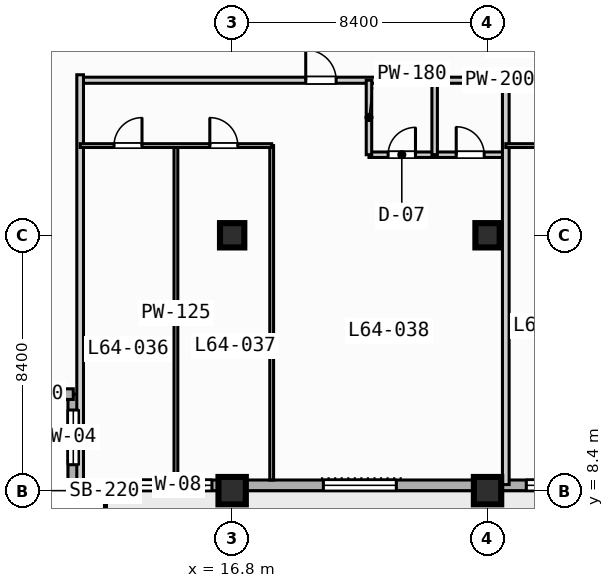
"""IFC4 building model, lengths in metres.
Left out: names, types, materials, properties, quantities, classifications, styles, units other than length and angle.
Written with IfcOpenShell. Run it as: python <this file> out.ifc"""

import sys

from ifc_helpers import new_model, si_unit, direction, frame, frame_2d, origin, origin_2d, place, context, subcontext, project, spatial, rectangle, extrude, element, fill, save


model = new_model("IFC4")
c1 = context("Model", 3, precision=1e-05, world=origin(), true_north=direction((0.0, 1.0)))
c2 = subcontext(c1, "Body", "Model", "MODEL_VIEW")
j1 = project(units=[si_unit("LENGTHUNIT", "METRE"), si_unit("PLANEANGLEUNIT", "RADIAN")], contexts=[c1])
p1 = place(None, origin())
s1 = spatial("IfcSite", under=j1, at=p1, CompositionType="ELEMENT")
p2 = place(p1, origin())
s2 = spatial("IfcBuilding", under=s1, at=p2, CompositionType="ELEMENT")
p3 = place(p2, frame((0.0, 0.0, 260.1)))
s3 = spatial("IfcBuildingStorey", under=s2, at=p3, CompositionType="ELEMENT", Elevation=260.1)
p4 = place(p3, frame((16.8, 8.4, 0.0), z_axis=(0.0, 0.0, 1.0), x_axis=(1.0, 0.0, 0.0)))
e1 = element("IfcColumn", 1, at=p4, inside=s3, PredefinedType="COLUMN", context=c2, shape_type="SweptSolid", body=[
    extrude(rectangle(XDim=0.9, YDim=0.9, at=origin_2d()), origin(), (0.0, 0.0, 1.0), 3.7),
])
p5 = place(p3, frame((16.8, 16.8, 0.0), z_axis=(0.0, 0.0, 1.0), x_axis=(1.0, 0.0, 0.0)))
e2 = element("IfcColumn", 2, at=p5, inside=s3, PredefinedType="COLUMN", context=c2, shape_type="SweptSolid", body=[
    extrude(rectangle(XDim=0.8, YDim=0.8, at=origin_2d()), origin(), (0.0, 0.0, 1.0), 3.7),
])
p6 = place(p3, frame((25.2, 8.4, 0.0), z_axis=(0.0, 0.0, 1.0), x_axis=(1.0, 0.0, 0.0)))
e3 = element("IfcColumn", 3, at=p6, inside=s3, PredefinedType="COLUMN", context=c2, shape_type="SweptSolid", body=[
    extrude(rectangle(XDim=0.9, YDim=0.9, at=origin_2d()), origin(), (0.0, 0.0, 1.0), 3.7),
])
p7 = place(p3, frame((25.2, 16.8, 0.0), z_axis=(0.0, 0.0, 1.0), x_axis=(1.0, 0.0, 0.0)))
e4 = element("IfcColumn", 4, at=p7, inside=s3, PredefinedType="COLUMN", context=c2, shape_type="SweptSolid", body=[
    extrude(rectangle(XDim=0.8, YDim=0.8, at=origin_2d()), origin(), (0.0, 0.0, 1.0), 3.7),
])
p8 = place(p3, frame((11.575, 8.575, 0.0), z_axis=(0.0, 0.0, 1.0), x_axis=(0.0, 1.0, 0.0)))
e5 = element("IfcWall", 5, at=p8, inside=s3, PredefinedType="STANDARD", context=c2, shape_type="SweptSolid", body=[
    extrude(rectangle(XDim=3.0, YDim=0.35, at=frame_2d((1.5, 0.0))), origin(), (0.0, 0.0, 1.0), 3.47),
])
p9 = place(p8, frame((0.677, 0.0, 0.85)))
e6 = element("IfcOpeningElement", 6, at=p9, cuts=e5, PredefinedType="OPENING", context=c2, shape_type="SweptSolid", body=[
    extrude(rectangle(XDim=1.8, YDim=1.8, at=frame_2d((0.9, 0.9))), frame((0.0, 0.185, 0.0), z_axis=(0.0, -1.0, 0.0), x_axis=(1.0, 0.0, 0.0)), (0.0, 0.0, 1.0), 0.37),
])
p10 = place(p3, frame((11.575, 11.575, 0.0), z_axis=(0.0, 0.0, 1.0), x_axis=(-1.0, 0.0, 0.0)))
e7 = element("IfcWall", 7, at=p10, inside=s3, PredefinedType="STANDARD", context=c2, shape_type="SweptSolid", body=[
    extrude(rectangle(XDim=3.0, YDim=0.35, at=frame_2d((1.5, 0.0))), origin(), (0.0, 0.0, 1.0), 3.47),
])
p11 = place(p3, frame((72.425, 8.575, 0.0), z_axis=(0.0, 0.0, 1.0), x_axis=(-1.0, 0.0, 0.0)))
e8 = element("IfcWall", 8, at=p11, inside=s3, PredefinedType="STANDARD", context=c2, shape_type="SweptSolid", body=[
    extrude(rectangle(XDim=60.85, YDim=0.35, at=frame_2d((30.425, 0.0))), origin(), (0.0, 0.0, 1.0), 3.47),
])
p12 = place(p11, frame((41.325, 0.0, 0.0)))
e9 = element("IfcOpeningElement", 9, at=p12, cuts=e8, PredefinedType="OPENING", context=c2, shape_type="SweptSolid", body=[
    extrude(rectangle(XDim=1.4, YDim=2.2, at=frame_2d((0.7, 1.1))), frame((0.0, 0.185, 0.0), z_axis=(0.0, -1.0, 0.0), x_axis=(1.0, 0.0, 0.0)), (0.0, 0.0, 1.0), 0.37),
])
p13 = place(p11, frame((50.225, 0.0, 0.85)))
e10 = element("IfcOpeningElement", 10, at=p13, cuts=e8, PredefinedType="OPENING", context=c2, shape_type="SweptSolid", body=[
    extrude(rectangle(XDim=2.4, YDim=1.95, at=frame_2d((1.2, 0.975))), frame((0.0, 0.185, 0.0), z_axis=(0.0, -1.0, 0.0), x_axis=(1.0, 0.0, 0.0)), (0.0, 0.0, 1.0), 0.37),
])
p14 = place(p11, frame((33.425, 0.0, 0.85)))
e11 = element("IfcOpeningElement", 11, at=p14, cuts=e8, PredefinedType="OPENING", context=c2, shape_type="SweptSolid", body=[
    extrude(rectangle(XDim=2.4, YDim=1.95, at=frame_2d((1.2, 0.975))), frame((0.0, 0.185, 0.0), z_axis=(0.0, -1.0, 0.0), x_axis=(1.0, 0.0, 0.0)), (0.0, 0.0, 1.0), 0.37),
])
p15 = place(p11, frame((25.325, 0.0, 0.85)))
e12 = element("IfcOpeningElement", 12, at=p15, cuts=e8, PredefinedType="OPENING", context=c2, shape_type="SweptSolid", body=[
    extrude(rectangle(XDim=1.8, YDim=1.8, at=frame_2d((0.9, 0.9))), frame((0.0, 0.185, 0.0), z_axis=(0.0, -1.0, 0.0), x_axis=(1.0, 0.0, 0.0)), (0.0, 0.0, 1.0), 0.37),
])
p16 = place(p11, frame((58.15, 0.0, 0.85)))
e13 = element("IfcOpeningElement", 13, at=p16, cuts=e8, PredefinedType="OPENING", context=c2, shape_type="SweptSolid", body=[
    extrude(rectangle(XDim=1.8, YDim=1.8, at=frame_2d((0.9, 0.9))), frame((0.0, 0.185, 0.0), z_axis=(0.0, -1.0, 0.0), x_axis=(1.0, 0.0, 0.0)), (0.0, 0.0, 1.0), 0.37),
])
p17 = place(p11, frame((56.29, 0.0, 0.85)))
e14 = element("IfcOpeningElement", 14, at=p17, cuts=e8, PredefinedType="OPENING", context=c2, shape_type="SweptSolid", body=[
    extrude(rectangle(XDim=0.72, YDim=1.8, at=frame_2d((0.36, 0.9))), frame((0.0, 0.185, 0.0), z_axis=(0.0, -1.0, 0.0), x_axis=(1.0, 0.0, 0.0)), (0.0, 0.0, 1.0), 0.37),
])
p18 = place(p11, frame((44.15, 0.0, 0.85)))
e15 = element("IfcOpeningElement", 15, at=p18, cuts=e8, PredefinedType="OPENING", context=c2, shape_type="SweptSolid", body=[
    extrude(rectangle(XDim=1.8, YDim=1.8, at=frame_2d((0.9, 0.9))), frame((0.0, 0.185, 0.0), z_axis=(0.0, -1.0, 0.0), x_axis=(1.0, 0.0, 0.0)), (0.0, 0.0, 1.0), 0.37),
])
p19 = place(p3, frame((11.8, 21.9, 0.0), z_axis=(0.0, 0.0, 1.0), x_axis=(1.0, 0.0, 0.0)))
e16 = element("IfcWall", 16, at=p19, inside=s3, PredefinedType="PARTITIONING", context=c2, shape_type="SweptSolid", body=[
    extrude(rectangle(XDim=27.6, YDim=0.2, at=frame_2d((13.8, 0.0))), origin(), (0.0, 0.0, 1.0), 3.47),
])
p20 = place(p19, frame((7.42, 0.0, 0.0)))
e17 = element("IfcOpeningElement", 17, at=p20, cuts=e16, PredefinedType="OPENING", context=c2, shape_type="SweptSolid", body=[
    extrude(rectangle(XDim=1.0, YDim=2.15, at=frame_2d((0.5, 1.075))), frame((0.0, 0.11, 0.0), z_axis=(0.0, -1.0, 0.0), x_axis=(1.0, 0.0, 0.0)), (0.0, 0.0, 1.0), 0.22),
])
p21 = place(p19, frame((21.22, 0.0, 0.0)))
e18 = element("IfcOpeningElement", 18, at=p21, cuts=e16, PredefinedType="OPENING", context=c2, shape_type="SweptSolid", body=[
    extrude(rectangle(XDim=1.0, YDim=2.15, at=frame_2d((0.5, 1.075))), frame((0.0, 0.11, 0.0), z_axis=(0.0, -1.0, 0.0), x_axis=(1.0, 0.0, 0.0)), (0.0, 0.0, 1.0), 0.22),
])
p22 = place(p3, frame((11.8, 8.6, 0.0), z_axis=(0.0, 0.0, 1.0), x_axis=(0.0, 1.0, 0.0)))
e19 = element("IfcWall", 19, at=p22, inside=s3, PredefinedType="PARTITIONING", context=c2, shape_type="SweptSolid", body=[
    extrude(rectangle(XDim=13.48, YDim=0.22, at=frame_2d((6.74, 0.0))), origin(), (0.0, 0.0, 1.0), 3.47),
])
p23 = place(p3, frame((21.3, 19.45, 0.0), z_axis=(0.0, 0.0, 1.0), x_axis=(1.0, 0.0, 0.0)))
e20 = element("IfcWall", 20, at=p23, inside=s3, PredefinedType="PLUMBINGWALL", context=c2, shape_type="SweptSolid", body=[
    extrude(rectangle(XDim=4.5, YDim=0.18, at=frame_2d((2.25, 0.0))), origin(), (0.0, 0.0, 1.0), 3.47),
])
p24 = place(p23, frame((0.63, 0.0, 0.0)))
e21 = element("IfcOpeningElement", 21, at=p24, cuts=e20, PredefinedType="OPENING", context=c2, shape_type="SweptSolid", body=[
    extrude(rectangle(XDim=0.9, YDim=2.1, at=frame_2d((0.45, 1.05))), frame((0.0, 0.1, 0.0), z_axis=(0.0, -1.0, 0.0), x_axis=(1.0, 0.0, 0.0)), (0.0, 0.0, 1.0), 0.2),
])
p25 = place(p23, frame((2.87, 0.0, 0.0)))
e22 = element("IfcOpeningElement", 22, at=p25, cuts=e20, PredefinedType="OPENING", context=c2, shape_type="SweptSolid", body=[
    extrude(rectangle(XDim=0.92, YDim=2.1, at=frame_2d((0.46, 1.05))), frame((0.0, 0.1, 0.0), z_axis=(0.0, -1.0, 0.0), x_axis=(1.0, 0.0, 0.0)), (0.0, 0.0, 1.0), 0.2),
])
for number, where, z_axis, x_axis in (
    (23, (21.3, 19.45, 0.0), (0.0, 0.0, 1.0), (0.0, 1.0, 0.0)),
    (24, (23.46, 19.45, 0.0), (0.0, 0.0, 1.0), (0.0, 1.0, 0.0)),
):
    element("IfcWall", number, at=place(p3, frame(where, z_axis=z_axis, x_axis=x_axis)), inside=s3, PredefinedType="PLUMBINGWALL", context=c2, shape_type="SweptSolid", body=[
        extrude(rectangle(XDim=2.45, YDim=0.18, at=frame_2d((1.225, 0.0))), origin(), (0.0, 0.0, 1.0), 3.47),
    ])
for number, where, z_axis, x_axis in (
    (25, (14.95, 8.75, 0.0), (0.0, 0.0, 1.0), (0.0, 1.0, 0.0)),
    (26, (18.1, 8.75, 0.0), (0.0, 0.0, 1.0), (0.0, 1.0, 0.0)),
):
    element("IfcWall", number, at=place(p3, frame(where, z_axis=z_axis, x_axis=x_axis)), inside=s3, PredefinedType="PARTITIONING", context=c2, shape_type="SweptSolid", body=[
        extrude(rectangle(XDim=11.0, YDim=0.125, at=frame_2d((5.5, 0.0))), origin(), (0.0, 0.0, 1.0), 3.47),
    ])
p26 = place(p3, frame((11.8, 19.75, 0.0), z_axis=(0.0, 0.0, 1.0), x_axis=(1.0, 0.0, 0.0)))
e27 = element("IfcWall", 27, at=p26, inside=s3, PredefinedType="PARTITIONING", context=c2, shape_type="SweptSolid", body=[
    extrude(rectangle(XDim=6.3, YDim=0.125, at=frame_2d((3.15, 0.0))), origin(), (0.0, 0.0, 1.0), 3.47),
])
p27 = place(p26, frame((1.115, 0.0, 0.0)))
e28 = element("IfcOpeningElement", 28, at=p27, cuts=e27, PredefinedType="OPENING", context=c2, shape_type="SweptSolid", body=[
    extrude(rectangle(XDim=0.92, YDim=2.1, at=frame_2d((0.46, 1.05))), frame((0.0, 0.073, 0.0), z_axis=(0.0, -1.0, 0.0), x_axis=(1.0, 0.0, 0.0)), (0.0, 0.0, 1.0), 0.145),
])
p28 = place(p26, frame((4.265, 0.0, 0.0)))
e29 = element("IfcOpeningElement", 29, at=p28, cuts=e27, PredefinedType="OPENING", context=c2, shape_type="SweptSolid", body=[
    extrude(rectangle(XDim=0.92, YDim=2.1, at=frame_2d((0.46, 1.05))), frame((0.0, 0.073, 0.0), z_axis=(0.0, -1.0, 0.0), x_axis=(1.0, 0.0, 0.0)), (0.0, 0.0, 1.0), 0.145),
])
p29 = place(p3, frame((25.8, 8.6, 0.0), z_axis=(0.0, 0.0, 1.0), x_axis=(0.0, 1.0, 0.0)))
e30 = element("IfcWall", 30, at=p29, inside=s3, PredefinedType="PARTITIONING", context=c2, shape_type="SweptSolid", body=[
    extrude(rectangle(XDim=13.48, YDim=0.22, at=frame_2d((6.74, 0.0))), origin(), (0.0, 0.0, 1.0), 3.47),
])
p30 = place(p3, frame((25.8, 19.75, 0.0), z_axis=(0.0, 0.0, 1.0), x_axis=(1.0, 0.0, 0.0)))
e31 = element("IfcWall", 31, at=p30, inside=s3, PredefinedType="PARTITIONING", context=c2, shape_type="SweptSolid", body=[
    extrude(rectangle(XDim=6.3, YDim=0.125, at=frame_2d((3.15, 0.0))), origin(), (0.0, 0.0, 1.0), 3.47),
])
p31 = place(p30, frame((1.115, 0.0, 0.0)))
e32 = element("IfcOpeningElement", 32, at=p31, cuts=e31, PredefinedType="OPENING", context=c2, shape_type="SweptSolid", body=[
    extrude(rectangle(XDim=0.92, YDim=2.1, at=frame_2d((0.46, 1.05))), frame((0.0, 0.073, 0.0), z_axis=(0.0, -1.0, 0.0), x_axis=(1.0, 0.0, 0.0)), (0.0, 0.0, 1.0), 0.145),
])
p32 = place(p30, frame((4.265, 0.0, 0.0)))
e33 = element("IfcOpeningElement", 33, at=p32, cuts=e31, PredefinedType="OPENING", context=c2, shape_type="SweptSolid", body=[
    extrude(rectangle(XDim=0.92, YDim=2.1, at=frame_2d((0.46, 1.05))), frame((0.0, 0.073, 0.0), z_axis=(0.0, -1.0, 0.0), x_axis=(1.0, 0.0, 0.0)), (0.0, 0.0, 1.0), 0.145),
])
p33 = place(p9, origin())
e34 = element("IfcWindow", 34, at=p33, inside=s3, PartitioningType="SINGLE_PANEL", PredefinedType="WINDOW", context=c2, shape_type="SweptSolid", body=[
    extrude(rectangle(XDim=1.8, YDim=1.8, at=frame_2d((0.9, 0.9))), frame((0.0, 0.03, 0.0), z_axis=(0.0, -1.0, 0.0), x_axis=(1.0, 0.0, 0.0)), (0.0, 0.0, 1.0), 0.06),
])
fill(e6, e34)
p34 = place(p13, origin())
e35 = element("IfcWindow", 35, at=p34, inside=s3, PartitioningType="SINGLE_PANEL", PredefinedType="WINDOW", context=c2, shape_type="SweptSolid", body=[
    extrude(rectangle(XDim=2.4, YDim=1.95, at=frame_2d((1.2, 0.975))), frame((0.0, 0.03, 0.0), z_axis=(0.0, -1.0, 0.0), x_axis=(1.0, 0.0, 0.0)), (0.0, 0.0, 1.0), 0.06),
])
fill(e10, e35)
p35 = place(p16, origin())
e36 = element("IfcWindow", 36, at=p35, inside=s3, PartitioningType="SINGLE_PANEL", PredefinedType="WINDOW", context=c2, shape_type="SweptSolid", body=[
    extrude(rectangle(XDim=1.8, YDim=1.8, at=frame_2d((0.9, 0.9))), frame((0.0, 0.03, 0.0), z_axis=(0.0, -1.0, 0.0), x_axis=(1.0, 0.0, 0.0)), (0.0, 0.0, 1.0), 0.06),
])
fill(e13, e36)
p36 = place(p17, origin())
e37 = element("IfcWindow", 37, at=p36, inside=s3, PartitioningType="SINGLE_PANEL", PredefinedType="WINDOW", context=c2, shape_type="SweptSolid", body=[
    extrude(rectangle(XDim=0.72, YDim=1.8, at=frame_2d((0.36, 0.9))), frame((0.0, 0.03, 0.0), z_axis=(0.0, -1.0, 0.0), x_axis=(1.0, 0.0, 0.0)), (0.0, 0.0, 1.0), 0.06),
])
fill(e14, e37)
p37 = place(p18, origin())
e38 = element("IfcWindow", 38, at=p37, inside=s3, PartitioningType="SINGLE_PANEL", PredefinedType="WINDOW", context=c2, shape_type="SweptSolid", body=[
    extrude(rectangle(XDim=1.8, YDim=1.8, at=frame_2d((0.9, 0.9))), frame((0.0, 0.03, 0.0), z_axis=(0.0, -1.0, 0.0), x_axis=(1.0, 0.0, 0.0)), (0.0, 0.0, 1.0), 0.06),
])
fill(e15, e38)
p38 = place(p20, origin())
e39 = element("IfcDoor", 39, at=p38, inside=s3, OperationType="SINGLE_SWING_LEFT", PredefinedType="DOOR", context=c2, shape_type="SweptSolid", body=[
    extrude(rectangle(XDim=1.0, YDim=2.15, at=frame_2d((0.5, 1.075))), frame((0.0, 0.025, 0.0), z_axis=(0.0, -1.0, 0.0), x_axis=(1.0, 0.0, 0.0)), (0.0, 0.0, 1.0), 0.05),
])
fill(e17, e39)
p39 = place(p24, origin())
e40 = element("IfcDoor", 40, at=p39, inside=s3, OperationType="SINGLE_SWING_RIGHT", PredefinedType="DOOR", context=c2, shape_type="SweptSolid", body=[
    extrude(rectangle(XDim=0.9, YDim=2.1, at=frame_2d((0.45, 1.05))), frame((0.0, 0.025, 0.0), z_axis=(0.0, -1.0, 0.0), x_axis=(1.0, 0.0, 0.0)), (0.0, 0.0, 1.0), 0.05),
])
fill(e21, e40)
p40 = place(p25, origin())
e41 = element("IfcDoor", 41, at=p40, inside=s3, OperationType="SINGLE_SWING_LEFT", PredefinedType="DOOR", context=c2, shape_type="SweptSolid", body=[
    extrude(rectangle(XDim=0.92, YDim=2.1, at=frame_2d((0.46, 1.05))), frame((0.0, 0.025, 0.0), z_axis=(0.0, -1.0, 0.0), x_axis=(1.0, 0.0, 0.0)), (0.0, 0.0, 1.0), 0.05),
])
fill(e22, e41)
p41 = place(p27, origin())
e42 = element("IfcDoor", 42, at=p41, inside=s3, OperationType="SINGLE_SWING_RIGHT", PredefinedType="DOOR", context=c2, shape_type="SweptSolid", body=[
    extrude(rectangle(XDim=0.92, YDim=2.1, at=frame_2d((0.46, 1.05))), frame((0.0, 0.025, 0.0), z_axis=(0.0, -1.0, 0.0), x_axis=(1.0, 0.0, 0.0)), (0.0, 0.0, 1.0), 0.05),
])
fill(e28, e42)
p42 = place(p28, origin())
e43 = element("IfcDoor", 43, at=p42, inside=s3, OperationType="SINGLE_SWING_LEFT", PredefinedType="DOOR", context=c2, shape_type="SweptSolid", body=[
    extrude(rectangle(XDim=0.92, YDim=2.1, at=frame_2d((0.46, 1.05))), frame((0.0, 0.025, 0.0), z_axis=(0.0, -1.0, 0.0), x_axis=(1.0, 0.0, 0.0)), (0.0, 0.0, 1.0), 0.05),
])
fill(e29, e43)
save(model, sys.argv[1])
